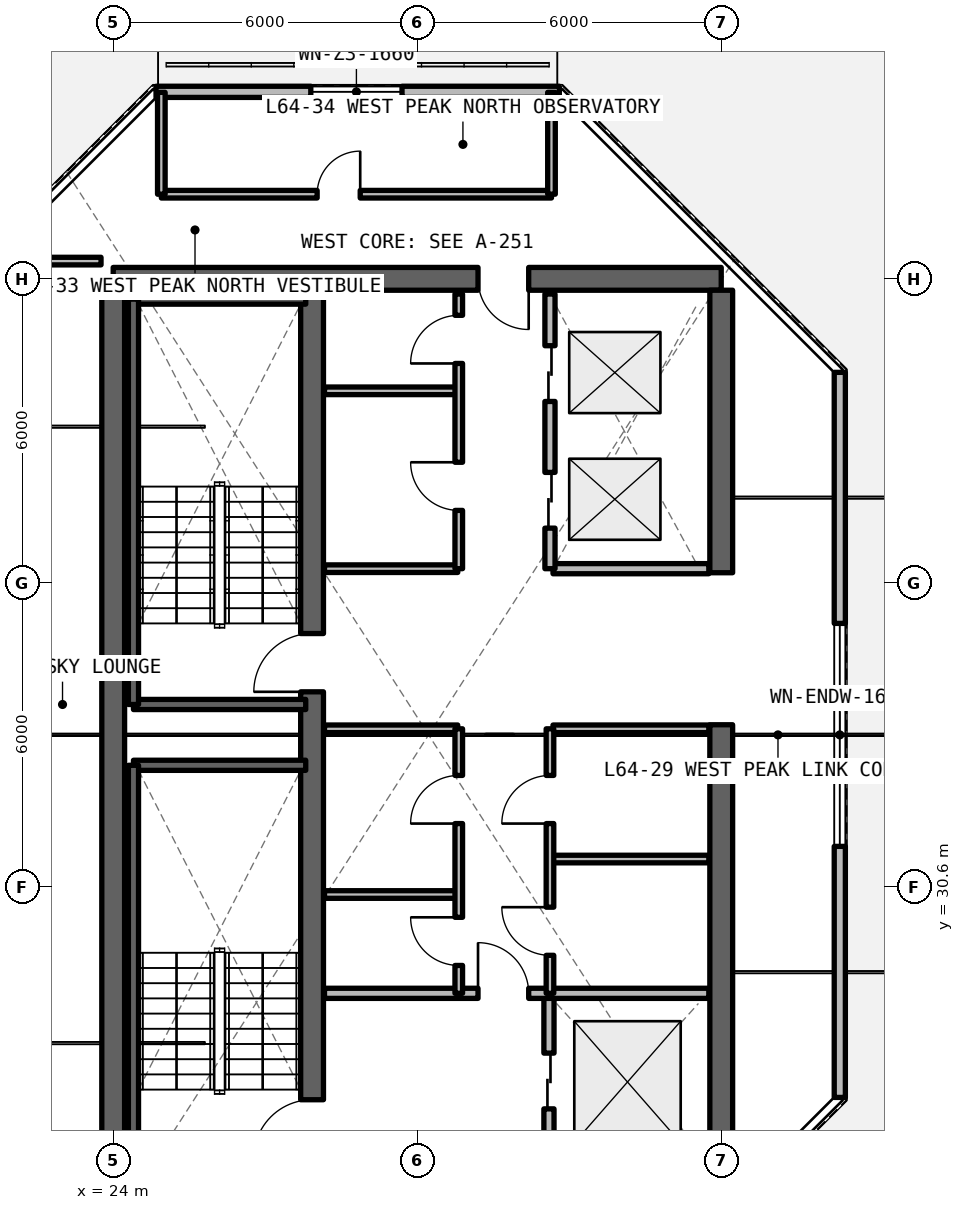
"""IFC4 building model, lengths in metres.
Left out: names, types, materials, properties, quantities, classifications, styles, units other than length and angle.
Written with IfcOpenShell. Run it as: python <this file> out.ifc"""

import sys

from ifc_helpers import new_model, si_unit, direction, frame, frame_2d, origin, place, context, subcontext, project, spatial, rectangle, extrude, element, fill, save


model = new_model("IFC4")
c1 = context("Model", 3, precision=1e-05, world=origin(), true_north=direction((0.0, 1.0)))
c2 = subcontext(c1, "Body", "Model", "MODEL_VIEW")
j1 = project(units=[si_unit("LENGTHUNIT", "METRE"), si_unit("PLANEANGLEUNIT", "RADIAN")], contexts=[c1])
p1 = place(None, origin())
s1 = spatial("IfcSite", under=j1, at=p1, CompositionType="ELEMENT")
p2 = place(p1, origin())
s2 = spatial("IfcBuilding", under=s1, at=p2, CompositionType="ELEMENT")
p3 = place(p2, frame((0.0, 0.0, 229.35)))
s3 = spatial("IfcBuildingStorey", under=s2, at=p3, CompositionType="ELEMENT", Elevation=229.35)
p4 = place(p3, frame((36.0, 42.6, 0.0), z_axis=(0.0, 0.0, 1.0), x_axis=(-1.0, 0.0, 0.0)))
e1 = element("IfcWall", 1, at=p4, inside=s3, PredefinedType="SHEAR", context=c2, shape_type="SweptSolid", body=[
    extrude(rectangle(XDim=12.0, YDim=0.45, at=frame_2d((6.0, 0.0))), origin(), (0.0, 0.0, 1.0), 3.3),
])
p5 = place(p4, frame((3.8, 0.0, 0.0)))
e2 = element("IfcOpeningElement", 2, at=p5, cuts=e1, PredefinedType="OPENING", context=c2, shape_type="SweptSolid", body=[
    extrude(rectangle(XDim=1.0, YDim=2.15, at=frame_2d((0.5, 1.075))), frame((0.0, 0.235, 0.0), z_axis=(0.0, -1.0, 0.0), x_axis=(1.0, 0.0, 0.0)), (0.0, 0.0, 1.0), 0.47),
])
p6 = place(p3, frame((24.0, 24.825, 0.0), z_axis=(0.0, 0.0, 1.0), x_axis=(0.0, 1.0, 0.0)))
e3 = element("IfcWall", 3, at=p6, inside=s3, PredefinedType="SHEAR", context=c2, shape_type="SweptSolid", body=[
    extrude(rectangle(XDim=17.55, YDim=0.45, at=frame_2d((8.775, 0.0))), origin(), (0.0, 0.0, 1.0), 3.3),
])
p7 = place(p3, frame((36.0, 24.825, 0.0), z_axis=(0.0, 0.0, 1.0), x_axis=(0.0, 1.0, 0.0)))
e4 = element("IfcWall", 4, at=p7, inside=s3, PredefinedType="SHEAR", context=c2, shape_type="SweptSolid", body=[
    extrude(rectangle(XDim=8.975, YDim=0.45, at=frame_2d((4.488, 0.0))), origin(), (0.0, 0.0, 1.0), 3.3),
])
p8 = place(p3, frame((36.0, 36.8, 0.0), z_axis=(0.0, 0.0, 1.0), x_axis=(0.0, 1.0, 0.0)))
e5 = element("IfcWall", 5, at=p8, inside=s3, PredefinedType="SHEAR", context=c2, shape_type="SweptSolid", body=[
    extrude(rectangle(XDim=5.575, YDim=0.45, at=frame_2d((2.788, 0.0))), origin(), (0.0, 0.0, 1.0), 3.3),
])
p9 = place(p3, frame((27.925, 24.825, 0.0), z_axis=(0.0, 0.0, 1.0), x_axis=(0.0, 1.0, 0.0)))
e6 = element("IfcWall", 6, at=p9, inside=s3, PredefinedType="SHEAR", context=c2, shape_type="SweptSolid", body=[
    extrude(rectangle(XDim=17.55, YDim=0.45, at=frame_2d((8.775, 0.0))), origin(), (0.0, 0.0, 1.0), 3.3),
])
p10 = place(p9, frame((0.425, 0.0, 0.0)))
e7 = element("IfcOpeningElement", 7, at=p10, cuts=e6, PredefinedType="OPENING", context=c2, shape_type="SweptSolid", body=[
    extrude(rectangle(XDim=1.15, YDim=2.15, at=frame_2d((0.575, 1.075))), frame((0.0, 0.235, 0.0), z_axis=(0.0, -1.0, 0.0), x_axis=(1.0, 0.0, 0.0)), (0.0, 0.0, 1.0), 0.47),
])
p11 = place(p9, frame((9.625, 0.0, 0.0)))
e8 = element("IfcOpeningElement", 8, at=p11, cuts=e6, PredefinedType="OPENING", context=c2, shape_type="SweptSolid", body=[
    extrude(rectangle(XDim=1.15, YDim=2.15, at=frame_2d((0.575, 1.075))), frame((0.0, 0.235, 0.0), z_axis=(0.0, -1.0, 0.0), x_axis=(1.0, 0.0, 0.0)), (0.0, 0.0, 1.0), 0.47),
])
p12 = place(p3, frame((38.34, 26.446, 0.0), z_axis=(0.0, 0.0, 1.0), x_axis=(0.0, 1.0, 0.0)))
e9 = element("IfcWall", 9, at=p12, inside=s3, PredefinedType="SOLIDWALL", context=c2, shape_type="SweptSolid", body=[
    extrude(rectangle(XDim=14.309, YDim=0.22, at=frame_2d((7.154, 0.0))), origin(), (0.0, 0.0, 1.0), 3.08),
])
p13 = place(p12, frame((4.954, 0.0, 0.78)))
e10 = element("IfcOpeningElement", 10, at=p13, cuts=e9, PredefinedType="OPENING", context=c2, shape_type="SweptSolid", body=[
    extrude(rectangle(XDim=4.4, YDim=1.66, at=frame_2d((2.2, 0.83))), frame((0.0, 0.12, 0.0), z_axis=(0.0, -1.0, 0.0), x_axis=(1.0, 0.0, 0.0)), (0.0, 0.0, 1.0), 0.24),
])
p14 = place(p3, frame((32.804, 46.29, 0.0), z_axis=(0.0, 0.0, 1.0), x_axis=(-1.0, 0.0, 0.0)))
e11 = element("IfcWall", 11, at=p14, inside=s3, PredefinedType="SOLIDWALL", context=c2, shape_type="SweptSolid", body=[
    extrude(rectangle(XDim=7.959, YDim=0.22, at=frame_2d((3.979, 0.0))), origin(), (0.0, 0.0, 1.0), 3.08),
])
p15 = place(p14, frame((3.104, 0.0, 0.78)))
e12 = element("IfcOpeningElement", 12, at=p15, cuts=e11, PredefinedType="OPENING", context=c2, shape_type="SweptSolid", body=[
    extrude(rectangle(XDim=1.8, YDim=1.66, at=frame_2d((0.9, 0.83))), frame((0.0, 0.12, 0.0), z_axis=(0.0, -1.0, 0.0), x_axis=(1.0, 0.0, 0.0)), (0.0, 0.0, 1.0), 0.24),
])
p16 = place(p3, frame((32.6, 24.92, 0.0), z_axis=(0.0, 0.0, 1.0), x_axis=(0.0, 1.0, 0.0)))
e13 = element("IfcWall", 13, at=p16, inside=s3, PredefinedType="SOLIDWALL", context=c2, shape_type="SweptSolid", body=[
    extrude(rectangle(XDim=3.58, YDim=0.2, at=frame_2d((1.79, 0.0))), origin(), (0.0, 0.0, 1.0), 2.35),
])
p17 = place(p16, frame((1.3, 0.0, 0.0)))
e14 = element("IfcOpeningElement", 14, at=p17, cuts=e13, PredefinedType="OPENING", context=c2, shape_type="SweptSolid", body=[
    extrude(rectangle(XDim=1.1, YDim=2.2, at=frame_2d((0.55, 1.1))), frame((0.0, 0.11, 0.0), z_axis=(0.0, -1.0, 0.0), x_axis=(1.0, 0.0, 0.0)), (0.0, 0.0, 1.0), 0.22),
])
p18 = place(p3, frame((28.17, 28.5, 0.0), z_axis=(0.0, 0.0, 1.0), x_axis=(1.0, 0.0, 0.0)))
e15 = element("IfcWall", 15, at=p18, inside=s3, PredefinedType="SOLIDWALL", context=c2, shape_type="SweptSolid", body=[
    extrude(rectangle(XDim=7.585, YDim=0.2, at=frame_2d((3.792, 0.0))), origin(), (0.0, 0.0, 1.0), 2.35),
])
p19 = place(p18, frame((3.03, 0.0, 0.0)))
e16 = element("IfcOpeningElement", 16, at=p19, cuts=e15, PredefinedType="OPENING", context=c2, shape_type="SweptSolid", body=[
    extrude(rectangle(XDim=1.0, YDim=2.15, at=frame_2d((0.5, 1.075))), frame((0.0, 0.11, 0.0), z_axis=(0.0, -1.0, 0.0), x_axis=(1.0, 0.0, 0.0)), (0.0, 0.0, 1.0), 0.22),
])
for number, where, z_axis, x_axis in (
    (17, (28.17, 30.45, 0.0), (0.0, 0.0, 1.0), (1.0, 0.0, 0.0)),
    (18, (28.17, 33.72, 0.0), (0.0, 0.0, 1.0), (1.0, 0.0, 0.0)),
):
    element("IfcWall", number, at=place(p3, frame(where, z_axis=z_axis, x_axis=x_axis)), inside=s3, PredefinedType="SOLIDWALL", context=c2, shape_type="SweptSolid", body=[
        extrude(rectangle(XDim=2.63, YDim=0.15, at=frame_2d((1.315, 0.0))), origin(), (0.0, 0.0, 1.0), 2.35),
    ])
p20 = place(p3, frame((30.82, 28.5, 0.0), z_axis=(0.0, 0.0, 1.0), x_axis=(0.0, 1.0, 0.0)))
e19 = element("IfcWall", 19, at=p20, inside=s3, PredefinedType="SOLIDWALL", context=c2, shape_type="SweptSolid", body=[
    extrude(rectangle(XDim=5.22, YDim=0.15, at=frame_2d((2.61, 0.0))), origin(), (0.0, 0.0, 1.0), 2.35),
])
p21 = place(p20, frame((0.55, 0.0, 0.0)))
e20 = element("IfcOpeningElement", 20, at=p21, cuts=e19, PredefinedType="OPENING", context=c2, shape_type="SweptSolid", body=[
    extrude(rectangle(XDim=0.95, YDim=2.15, at=frame_2d((0.475, 1.075))), frame((0.0, 0.085, 0.0), z_axis=(0.0, -1.0, 0.0), x_axis=(1.0, 0.0, 0.0)), (0.0, 0.0, 1.0), 0.17),
])
p22 = place(p20, frame((3.35, 0.0, 0.0)))
e21 = element("IfcOpeningElement", 21, at=p22, cuts=e19, PredefinedType="OPENING", context=c2, shape_type="SweptSolid", body=[
    extrude(rectangle(XDim=0.95, YDim=2.15, at=frame_2d((0.475, 1.075))), frame((0.0, 0.085, 0.0), z_axis=(0.0, -1.0, 0.0), x_axis=(1.0, 0.0, 0.0)), (0.0, 0.0, 1.0), 0.17),
])
for number, where, z_axis, x_axis in (
    (22, (32.68, 31.15, 0.0), (0.0, 0.0, 1.0), (1.0, 0.0, 0.0)),
    (23, (32.68, 33.72, 0.0), (0.0, 0.0, 1.0), (1.0, 0.0, 0.0)),
):
    element("IfcWall", number, at=place(p3, frame(where, z_axis=z_axis, x_axis=x_axis)), inside=s3, PredefinedType="SOLIDWALL", context=c2, shape_type="SweptSolid", body=[
        extrude(rectangle(XDim=3.075, YDim=0.15, at=frame_2d((1.538, 0.0))), origin(), (0.0, 0.0, 1.0), 2.35),
    ])
p23 = place(p3, frame((32.62, 28.5, 0.0), z_axis=(0.0, 0.0, 1.0), x_axis=(0.0, 1.0, 0.0)))
e24 = element("IfcWall", 24, at=p23, inside=s3, PredefinedType="SOLIDWALL", context=c2, shape_type="SweptSolid", body=[
    extrude(rectangle(XDim=5.22, YDim=0.15, at=frame_2d((2.61, 0.0))), origin(), (0.0, 0.0, 1.0), 2.35),
])
p24 = place(p23, frame((0.75, 0.0, 0.0)))
e25 = element("IfcOpeningElement", 25, at=p24, cuts=e24, PredefinedType="OPENING", context=c2, shape_type="SweptSolid", body=[
    extrude(rectangle(XDim=0.95, YDim=2.15, at=frame_2d((0.475, 1.075))), frame((0.0, 0.085, 0.0), z_axis=(0.0, -1.0, 0.0), x_axis=(1.0, 0.0, 0.0)), (0.0, 0.0, 1.0), 0.17),
])
p25 = place(p23, frame((3.35, 0.0, 0.0)))
e26 = element("IfcOpeningElement", 26, at=p25, cuts=e24, PredefinedType="OPENING", context=c2, shape_type="SweptSolid", body=[
    extrude(rectangle(XDim=0.95, YDim=2.15, at=frame_2d((0.475, 1.075))), frame((0.0, 0.085, 0.0), z_axis=(0.0, -1.0, 0.0), x_axis=(1.0, 0.0, 0.0)), (0.0, 0.0, 1.0), 0.17),
])
for number, where, z_axis, x_axis in (
    (27, (28.17, 36.88, 0.0), (0.0, 0.0, 1.0), (1.0, 0.0, 0.0)),
    (28, (28.17, 40.39, 0.0), (0.0, 0.0, 1.0), (1.0, 0.0, 0.0)),
):
    element("IfcWall", number, at=place(p3, frame(where, z_axis=z_axis, x_axis=x_axis)), inside=s3, PredefinedType="SOLIDWALL", context=c2, shape_type="SweptSolid", body=[
        extrude(rectangle(XDim=2.63, YDim=0.15, at=frame_2d((1.315, 0.0))), origin(), (0.0, 0.0, 1.0), 2.35),
    ])
p26 = place(p3, frame((30.82, 36.88, 0.0), z_axis=(0.0, 0.0, 1.0), x_axis=(0.0, 1.0, 0.0)))
e29 = element("IfcWall", 29, at=p26, inside=s3, PredefinedType="SOLIDWALL", context=c2, shape_type="SweptSolid", body=[
    extrude(rectangle(XDim=5.42, YDim=0.15, at=frame_2d((2.71, 0.0))), origin(), (0.0, 0.0, 1.0), 2.35),
])
p27 = place(p26, frame((1.15, 0.0, 0.0)))
e30 = element("IfcOpeningElement", 30, at=p27, cuts=e29, PredefinedType="OPENING", context=c2, shape_type="SweptSolid", body=[
    extrude(rectangle(XDim=0.95, YDim=2.15, at=frame_2d((0.475, 1.075))), frame((0.0, 0.085, 0.0), z_axis=(0.0, -1.0, 0.0), x_axis=(1.0, 0.0, 0.0)), (0.0, 0.0, 1.0), 0.17),
])
p28 = place(p26, frame((4.05, 0.0, 0.0)))
e31 = element("IfcOpeningElement", 31, at=p28, cuts=e29, PredefinedType="OPENING", context=c2, shape_type="SweptSolid", body=[
    extrude(rectangle(XDim=0.95, YDim=2.15, at=frame_2d((0.475, 1.075))), frame((0.0, 0.085, 0.0), z_axis=(0.0, -1.0, 0.0), x_axis=(1.0, 0.0, 0.0)), (0.0, 0.0, 1.0), 0.17),
])
p29 = place(p3, frame((32.68, 36.88, 0.0), z_axis=(0.0, 0.0, 1.0), x_axis=(1.0, 0.0, 0.0)))
e32 = element("IfcWall", 32, at=p29, inside=s3, PredefinedType="SOLIDWALL", context=c2, shape_type="SweptSolid", body=[
    extrude(rectangle(XDim=3.075, YDim=0.2, at=frame_2d((1.538, 0.0))), origin(), (0.0, 0.0, 1.0), 2.35),
])
p30 = place(p3, frame((32.62, 36.88, 0.0), z_axis=(0.0, 0.0, 1.0), x_axis=(0.0, 1.0, 0.0)))
e33 = element("IfcWall", 33, at=p30, inside=s3, PredefinedType="SOLIDWALL", context=c2, shape_type="SweptSolid", body=[
    extrude(rectangle(XDim=5.42, YDim=0.2, at=frame_2d((2.71, 0.0))), origin(), (0.0, 0.0, 1.0), 2.35),
])
p31 = place(p30, frame((0.8, 0.0, 0.0)))
e34 = element("IfcOpeningElement", 34, at=p31, cuts=e33, PredefinedType="OPENING", context=c2, shape_type="SweptSolid", body=[
    extrude(rectangle(XDim=1.1, YDim=2.2, at=frame_2d((0.55, 1.1))), frame((0.0, 0.11, 0.0), z_axis=(0.0, -1.0, 0.0), x_axis=(1.0, 0.0, 0.0)), (0.0, 0.0, 1.0), 0.22),
])
p32 = place(p30, frame((3.3, 0.0, 0.0)))
e35 = element("IfcOpeningElement", 35, at=p32, cuts=e33, PredefinedType="OPENING", context=c2, shape_type="SweptSolid", body=[
    extrude(rectangle(XDim=1.1, YDim=2.2, at=frame_2d((0.55, 1.1))), frame((0.0, 0.11, 0.0), z_axis=(0.0, -1.0, 0.0), x_axis=(1.0, 0.0, 0.0)), (0.0, 0.0, 1.0), 0.22),
])
p33 = place(p3, frame((22.12, 42.95, 0.0), z_axis=(0.0, 0.0, 1.0), x_axis=(1.0, 0.0, 0.0)))
e36 = element("IfcWall", 36, at=p33, inside=s3, PredefinedType="SOLIDWALL", context=c2, shape_type="SweptSolid", body=[
    extrude(rectangle(XDim=1.64, YDim=0.15, at=frame_2d((0.82, 0.0))), origin(), (0.0, 0.0, 1.0), 2.35),
])
p34 = place(p3, frame((24.95, 44.27, 0.0), z_axis=(0.0, 0.0, 1.0), x_axis=(1.0, 0.0, 0.0)))
e37 = element("IfcWall", 37, at=p34, inside=s3, PredefinedType="SOLIDWALL", context=c2, shape_type="SweptSolid", body=[
    extrude(rectangle(XDim=7.7, YDim=0.15, at=frame_2d((3.85, 0.0))), origin(), (0.0, 0.0, 1.0), 2.35),
])
p35 = place(p34, frame((3.075, 0.0, 0.0)))
e38 = element("IfcOpeningElement", 38, at=p35, cuts=e37, PredefinedType="OPENING", context=c2, shape_type="SweptSolid", body=[
    extrude(rectangle(XDim=0.85, YDim=2.1, at=frame_2d((0.425, 1.05))), frame((0.0, 0.085, 0.0), z_axis=(0.0, -1.0, 0.0), x_axis=(1.0, 0.0, 0.0)), (0.0, 0.0, 1.0), 0.17),
])
for number, where, z_axis, x_axis in (
    (39, (24.95, 44.27, 0.0), (0.0, 0.0, 1.0), (0.0, 1.0, 0.0)),
    (40, (32.65, 44.27, 0.0), (0.0, 0.0, 1.0), (0.0, 1.0, 0.0)),
):
    element("IfcWall", number, at=place(p3, frame(where, z_axis=z_axis, x_axis=x_axis)), inside=s3, PredefinedType="SOLIDWALL", context=c2, shape_type="SweptSolid", body=[
        extrude(rectangle(XDim=2.01, YDim=0.15, at=frame_2d((1.005, 0.0))), origin(), (0.0, 0.0, 1.0), 2.35),
    ])
p36 = place(p3, frame((27.8, 33.0, 0.0), z_axis=(0.0, 0.0, 1.0), x_axis=(-1.0, 0.0, 0.0)))
e41 = element("IfcWall", 41, at=p36, inside=s3, PredefinedType="SOLIDWALL", context=c2, shape_type="SweptSolid", body=[
    extrude(rectangle(XDim=3.4, YDim=0.2, at=frame_2d((1.7, 0.0))), origin(), (0.0, 0.0, 1.0), 3.3),
])
p37 = place(p3, frame((24.4, 33.0, 0.0), z_axis=(0.0, 0.0, 1.0), x_axis=(0.0, -1.0, 0.0)))
e42 = element("IfcWall", 42, at=p37, inside=s3, PredefinedType="SOLIDWALL", context=c2, shape_type="SweptSolid", body=[
    extrude(rectangle(XDim=8.0, YDim=0.2, at=frame_2d((4.0, 0.0))), origin(), (0.0, 0.0, 1.0), 3.3),
])
for number, where, z_axis, x_axis in (
    (43, (24.4, 34.2, 0.0), (0.0, 0.0, 1.0), (1.0, 0.0, 0.0)),
    (44, (27.8, 42.2, 0.0), (0.0, 0.0, 1.0), (-1.0, 0.0, 0.0)),
):
    element("IfcWall", number, at=place(p3, frame(where, z_axis=z_axis, x_axis=x_axis)), inside=s3, PredefinedType="SOLIDWALL", context=c2, shape_type="SweptSolid", body=[
        extrude(rectangle(XDim=3.4, YDim=0.2, at=frame_2d((1.7, 0.0))), origin(), (0.0, 0.0, 1.0), 3.3),
    ])
p38 = place(p3, frame((24.4, 42.2, 0.0), z_axis=(0.0, 0.0, 1.0), x_axis=(0.0, -1.0, 0.0)))
e45 = element("IfcWall", 45, at=p38, inside=s3, PredefinedType="SOLIDWALL", context=c2, shape_type="SweptSolid", body=[
    extrude(rectangle(XDim=8.0, YDim=0.2, at=frame_2d((4.0, 0.0))), origin(), (0.0, 0.0, 1.0), 3.3),
])
p39 = place(p13, origin())
e46 = element("IfcWindow", 46, at=p39, inside=s3, PartitioningType="SINGLE_PANEL", PredefinedType="WINDOW", context=c2, shape_type="SweptSolid", body=[
    extrude(rectangle(XDim=4.4, YDim=1.66, at=frame_2d((2.2, 0.83))), frame((0.0, 0.03, 0.0), z_axis=(0.0, -1.0, 0.0), x_axis=(1.0, 0.0, 0.0)), (0.0, 0.0, 1.0), 0.06),
])
fill(e10, e46)
p40 = place(p15, origin())
e47 = element("IfcWindow", 47, at=p40, inside=s3, PartitioningType="SINGLE_PANEL", PredefinedType="WINDOW", context=c2, shape_type="SweptSolid", body=[
    extrude(rectangle(XDim=1.8, YDim=1.66, at=frame_2d((0.9, 0.83))), frame((0.0, 0.03, 0.0), z_axis=(0.0, -1.0, 0.0), x_axis=(1.0, 0.0, 0.0)), (0.0, 0.0, 1.0), 0.06),
])
fill(e12, e47)
p41 = place(p17, origin())
e48 = element("IfcDoor", 48, at=p41, inside=s3, OperationType="SLIDING_TO_LEFT", PredefinedType="DOOR", context=c2, shape_type="SweptSolid", body=[
    extrude(rectangle(XDim=1.1, YDim=2.2, at=frame_2d((0.55, 1.1))), frame((0.0, 0.025, 0.0), z_axis=(0.0, -1.0, 0.0), x_axis=(1.0, 0.0, 0.0)), (0.0, 0.0, 1.0), 0.05),
])
fill(e14, e48)
p42 = place(p19, origin())
e49 = element("IfcDoor", 49, at=p42, inside=s3, OperationType="SINGLE_SWING_LEFT", PredefinedType="DOOR", context=c2, shape_type="SweptSolid", body=[
    extrude(rectangle(XDim=1.0, YDim=2.15, at=frame_2d((0.5, 1.075))), frame((0.0, 0.025, 0.0), z_axis=(0.0, -1.0, 0.0), x_axis=(1.0, 0.0, 0.0)), (0.0, 0.0, 1.0), 0.05),
])
fill(e16, e49)
p43 = place(p21, origin())
e50 = element("IfcDoor", 50, at=p43, inside=s3, OperationType="SINGLE_SWING_RIGHT", PredefinedType="DOOR", context=c2, shape_type="SweptSolid", body=[
    extrude(rectangle(XDim=0.95, YDim=2.15, at=frame_2d((0.475, 1.075))), frame((0.0, 0.025, 0.0), z_axis=(0.0, -1.0, 0.0), x_axis=(1.0, 0.0, 0.0)), (0.0, 0.0, 1.0), 0.05),
])
fill(e20, e50)
p44 = place(p22, origin())
e51 = element("IfcDoor", 51, at=p44, inside=s3, OperationType="SINGLE_SWING_LEFT", PredefinedType="DOOR", context=c2, shape_type="SweptSolid", body=[
    extrude(rectangle(XDim=0.95, YDim=2.15, at=frame_2d((0.475, 1.075))), frame((0.0, 0.025, 0.0), z_axis=(0.0, -1.0, 0.0), x_axis=(1.0, 0.0, 0.0)), (0.0, 0.0, 1.0), 0.05),
])
fill(e21, e51)
p45 = place(p24, origin())
e52 = element("IfcDoor", 52, at=p45, inside=s3, OperationType="SINGLE_SWING_RIGHT", PredefinedType="DOOR", context=c2, shape_type="SweptSolid", body=[
    extrude(rectangle(XDim=0.95, YDim=2.15, at=frame_2d((0.475, 1.075))), frame((0.0, 0.025, 0.0), z_axis=(0.0, -1.0, 0.0), x_axis=(1.0, 0.0, 0.0)), (0.0, 0.0, 1.0), 0.05),
])
fill(e25, e52)
p46 = place(p25, origin())
e53 = element("IfcDoor", 53, at=p46, inside=s3, OperationType="SINGLE_SWING_LEFT", PredefinedType="DOOR", context=c2, shape_type="SweptSolid", body=[
    extrude(rectangle(XDim=0.95, YDim=2.15, at=frame_2d((0.475, 1.075))), frame((0.0, 0.025, 0.0), z_axis=(0.0, -1.0, 0.0), x_axis=(1.0, 0.0, 0.0)), (0.0, 0.0, 1.0), 0.05),
])
fill(e26, e53)
p47 = place(p27, origin())
e54 = element("IfcDoor", 54, at=p47, inside=s3, OperationType="SINGLE_SWING_RIGHT", PredefinedType="DOOR", context=c2, shape_type="SweptSolid", body=[
    extrude(rectangle(XDim=0.95, YDim=2.15, at=frame_2d((0.475, 1.075))), frame((0.0, 0.025, 0.0), z_axis=(0.0, -1.0, 0.0), x_axis=(1.0, 0.0, 0.0)), (0.0, 0.0, 1.0), 0.05),
])
fill(e30, e54)
p48 = place(p28, origin())
e55 = element("IfcDoor", 55, at=p48, inside=s3, OperationType="SINGLE_SWING_LEFT", PredefinedType="DOOR", context=c2, shape_type="SweptSolid", body=[
    extrude(rectangle(XDim=0.95, YDim=2.15, at=frame_2d((0.475, 1.075))), frame((0.0, 0.025, 0.0), z_axis=(0.0, -1.0, 0.0), x_axis=(1.0, 0.0, 0.0)), (0.0, 0.0, 1.0), 0.05),
])
fill(e31, e55)
p49 = place(p31, origin())
e56 = element("IfcDoor", 56, at=p49, inside=s3, OperationType="SLIDING_TO_LEFT", PredefinedType="DOOR", context=c2, shape_type="SweptSolid", body=[
    extrude(rectangle(XDim=1.1, YDim=2.2, at=frame_2d((0.55, 1.1))), frame((0.0, 0.025, 0.0), z_axis=(0.0, -1.0, 0.0), x_axis=(1.0, 0.0, 0.0)), (0.0, 0.0, 1.0), 0.05),
])
fill(e34, e56)
p50 = place(p32, origin())
e57 = element("IfcDoor", 57, at=p50, inside=s3, OperationType="SLIDING_TO_RIGHT", PredefinedType="DOOR", context=c2, shape_type="SweptSolid", body=[
    extrude(rectangle(XDim=1.1, YDim=2.2, at=frame_2d((0.55, 1.1))), frame((0.0, 0.025, 0.0), z_axis=(0.0, -1.0, 0.0), x_axis=(1.0, 0.0, 0.0)), (0.0, 0.0, 1.0), 0.05),
])
fill(e35, e57)
p51 = place(p35, origin())
e58 = element("IfcDoor", 58, at=p51, inside=s3, OperationType="SINGLE_SWING_RIGHT", PredefinedType="DOOR", context=c2, shape_type="SweptSolid", body=[
    extrude(rectangle(XDim=0.85, YDim=2.1, at=frame_2d((0.425, 1.05))), frame((0.0, 0.025, 0.0), z_axis=(0.0, -1.0, 0.0), x_axis=(1.0, 0.0, 0.0)), (0.0, 0.0, 1.0), 0.05),
])
fill(e38, e58)
p52 = place(p10, origin())
e59 = element("IfcDoor", 59, at=p52, inside=s3, OperationType="SINGLE_SWING_LEFT", PredefinedType="DOOR", context=c2, shape_type="SweptSolid", body=[
    extrude(rectangle(XDim=1.15, YDim=2.15, at=frame_2d((0.575, 1.075))), frame((0.0, 0.025, 0.0), z_axis=(0.0, -1.0, 0.0), x_axis=(1.0, 0.0, 0.0)), (0.0, 0.0, 1.0), 0.05),
])
fill(e7, e59)
p53 = place(p11, origin())
e60 = element("IfcDoor", 60, at=p53, inside=s3, OperationType="SINGLE_SWING_RIGHT", PredefinedType="DOOR", context=c2, shape_type="SweptSolid", body=[
    extrude(rectangle(XDim=1.15, YDim=2.15, at=frame_2d((0.575, 1.075))), frame((0.0, 0.025, 0.0), z_axis=(0.0, -1.0, 0.0), x_axis=(1.0, 0.0, 0.0)), (0.0, 0.0, 1.0), 0.05),
])
fill(e8, e60)
p54 = place(p5, origin())
e61 = element("IfcDoor", 61, at=p54, inside=s3, OperationType="SINGLE_SWING_RIGHT", PredefinedType="DOOR", context=c2, shape_type="SweptSolid", body=[
    extrude(rectangle(XDim=1.0, YDim=2.15, at=frame_2d((0.5, 1.075))), frame((0.0, 0.025, 0.0), z_axis=(0.0, -1.0, 0.0), x_axis=(1.0, 0.0, 0.0)), (0.0, 0.0, 1.0), 0.05),
])
fill(e2, e61)
save(model, sys.argv[1])
